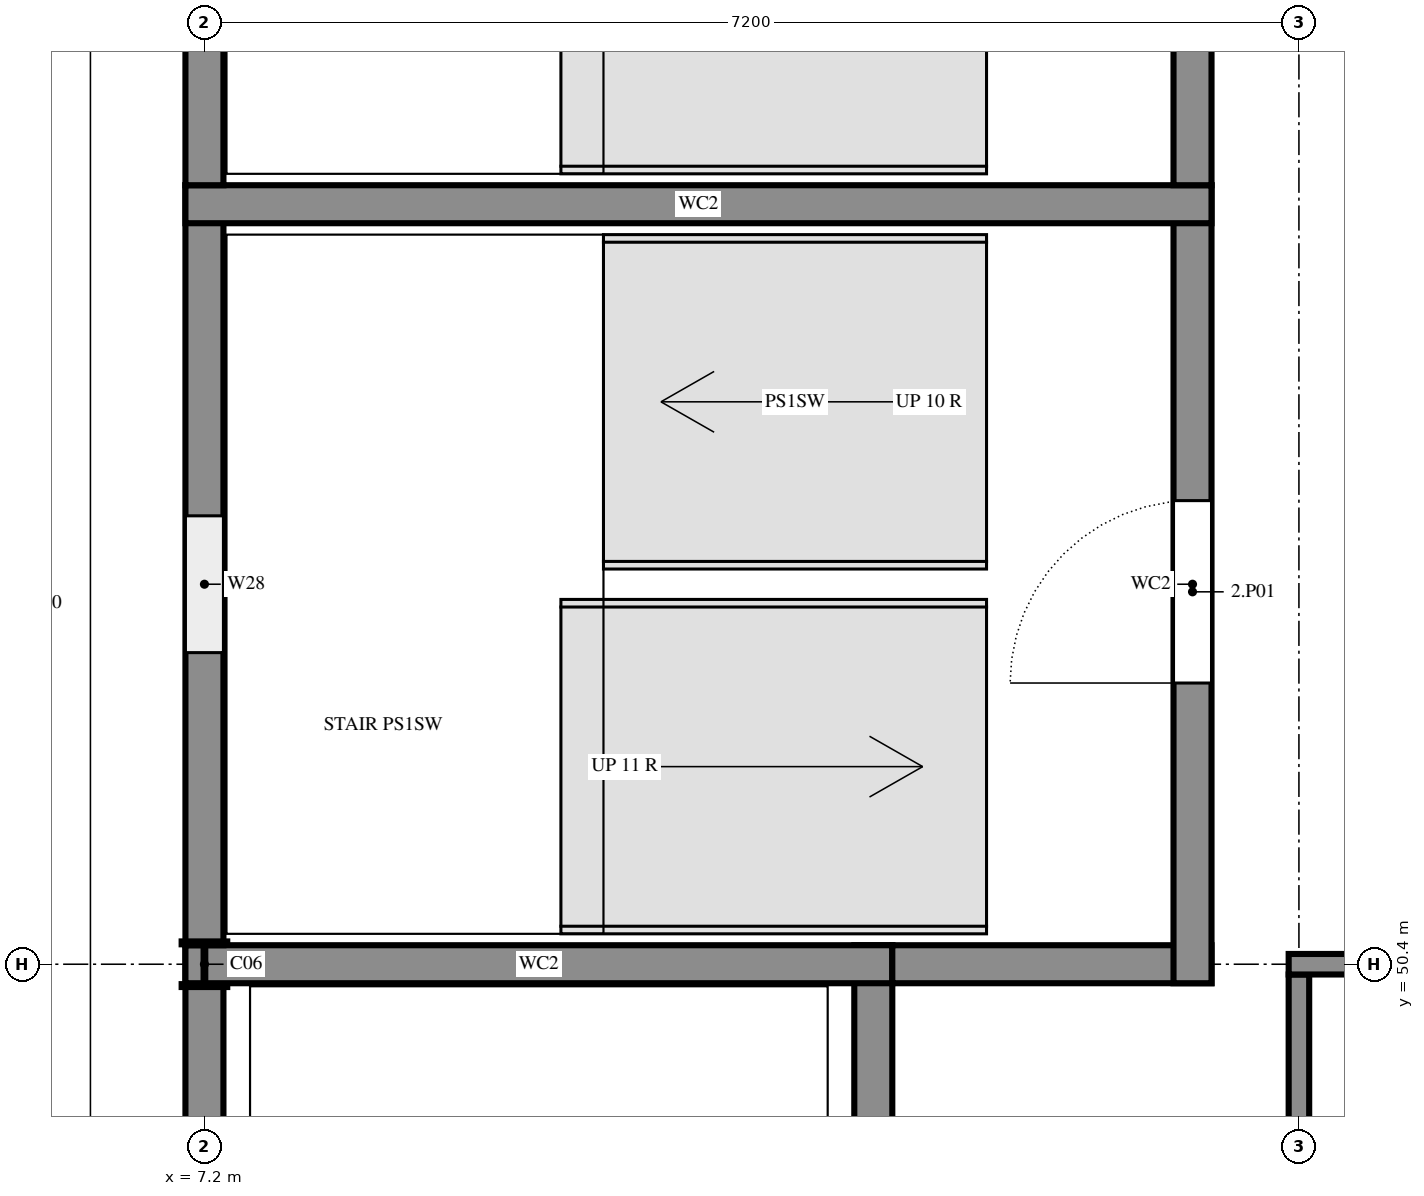
"""IFC4 building model, lengths in metres.
Left out: names, types, materials, properties, quantities, classifications, styles, units other than length and angle.
Written with IfcOpenShell. Run it as: python <this file> out.ifc"""

import sys

from ifc_helpers import new_model, si_unit, direction, frame, frame_2d, origin, origin_2d, place, context, subcontext, project, spatial, rectangle, i_section, extrude, element, fill, save


model = new_model("IFC4")
c1 = context("Model", 3, precision=1e-05, world=origin(), true_north=direction((0.0, 1.0)))
c2 = subcontext(c1, "Body", "Model", "MODEL_VIEW")
j1 = project(units=[si_unit("LENGTHUNIT", "METRE"), si_unit("PLANEANGLEUNIT", "RADIAN")], contexts=[c1])
p1 = place(None, origin())
s1 = spatial("IfcSite", under=j1, at=p1, CompositionType="ELEMENT")
p2 = place(p1, origin())
s2 = spatial("IfcBuilding", under=s1, at=p2, CompositionType="ELEMENT")
p3 = place(p2, frame((0.0, 0.0, 7.2)))
s3 = spatial("IfcBuildingStorey", under=s2, at=p3, CompositionType="ELEMENT", Elevation=7.2)
p4 = place(p3, frame((7.2, 50.4, 0.0), z_axis=(0.0, 0.0, 1.0), x_axis=(1.0, 0.0, 0.0)))
e1 = element("IfcColumn", 1, at=p4, inside=s3, PredefinedType="COLUMN", context=c2, shape_type="SweptSolid", body=[
    extrude(i_section(OverallWidth=0.3, OverallDepth=0.3, WebThickness=0.011, FlangeThickness=0.019, FilletRadius=0.027, at=origin_2d()), origin(), (0.0, 0.0, 1.0), 3.6),
])
p5 = place(p3, frame((11.6, 44.275, 0.0), z_axis=(0.0, 0.0, 1.0), x_axis=(0.0, 1.0, 0.0)))
e2 = element("IfcWall", 2, at=p5, inside=s3, PredefinedType="SHEAR", context=c2, shape_type="SweptSolid", body=[
    extrude(rectangle(XDim=6.25, YDim=0.25, at=frame_2d((3.125, 0.0))), origin(), (0.0, 0.0, 1.0), 3.6),
])
p6 = place(p5, frame((0.375, 0.0, 0.0)))
e3 = element("IfcOpeningElement", 3, at=p6, cuts=e2, PredefinedType="OPENING", context=c2, shape_type="SweptSolid", body=[
    extrude(rectangle(XDim=1.0, YDim=2.4, at=frame_2d((0.5, 1.2))), frame((0.0, 0.135, 0.0), z_axis=(0.0, -1.0, 0.0), x_axis=(1.0, 0.0, 0.0)), (0.0, 0.0, 1.0), 0.27),
])
p7 = place(p3, frame((7.2, 50.525, 0.0), z_axis=(0.0, 0.0, 1.0), x_axis=(0.0, -1.0, 0.0)))
e4 = element("IfcWall", 4, at=p7, inside=s3, PredefinedType="SHEAR", context=c2, shape_type="SweptSolid", body=[
    extrude(rectangle(XDim=6.25, YDim=0.25, at=frame_2d((3.125, 0.0))), origin(), (0.0, 0.0, 1.0), 3.6),
])
p8 = place(p7, frame((2.675, 0.0, 0.6)))
e5 = element("IfcOpeningElement", 5, at=p8, cuts=e4, PredefinedType="OPENING", context=c2, shape_type="SweptSolid", body=[
    extrude(rectangle(XDim=0.9, YDim=2.1, at=frame_2d((0.45, 1.05))), frame((0.0, 0.135, 0.0), z_axis=(0.0, -1.0, 0.0), x_axis=(1.0, 0.0, 0.0)), (0.0, 0.0, 1.0), 0.27),
])
p9 = place(p3, frame((11.725, 50.4, 0.0), z_axis=(0.0, 0.0, 1.0), x_axis=(-1.0, 0.0, 0.0)))
e6 = element("IfcWall", 6, at=p9, inside=s3, PredefinedType="SHEAR", context=c2, shape_type="SweptSolid", body=[
    extrude(rectangle(XDim=4.65, YDim=0.25, at=frame_2d((2.325, 0.0))), origin(), (0.0, 0.0, 1.0), 3.6),
])
p10 = place(p3, frame((11.725, 50.4, 0.0), z_axis=(0.0, 0.0, 1.0), x_axis=(1.0, 0.0, 0.0)))
e7 = element("IfcWall", 7, at=p10, inside=s3, PredefinedType="SHEAR", context=c2, shape_type="SweptSolid", body=[
    extrude(rectangle(XDim=2.1, YDim=0.25, at=frame_2d((1.05, 0.0))), origin(), (0.0, 0.0, 1.0), 3.6),
])
p11 = place(p3, frame((13.7, 50.275, 0.0), z_axis=(0.0, 0.0, 1.0), x_axis=(0.0, 1.0, 0.0)))
e8 = element("IfcWall", 8, at=p11, inside=s3, PredefinedType="SHEAR", context=c2, shape_type="SweptSolid", body=[
    extrude(rectangle(XDim=5.25, YDim=0.25, at=frame_2d((2.625, 0.0))), origin(), (0.0, 0.0, 1.0), 3.6),
])
p12 = place(p11, frame((1.975, 0.0, 0.0)))
e9 = element("IfcOpeningElement", 9, at=p12, cuts=e8, PredefinedType="OPENING", context=c2, shape_type="SweptSolid", body=[
    extrude(rectangle(XDim=1.2, YDim=2.4, at=frame_2d((0.6, 1.2))), frame((0.0, 0.135, 0.0), z_axis=(0.0, -1.0, 0.0), x_axis=(1.0, 0.0, 0.0)), (0.0, 0.0, 1.0), 0.27),
])
p13 = place(p3, frame((7.2, 55.525, 0.0), z_axis=(0.0, 0.0, 1.0), x_axis=(0.0, -1.0, 0.0)))
e10 = element("IfcWall", 10, at=p13, inside=s3, PredefinedType="SHEAR", context=c2, shape_type="SweptSolid", body=[
    extrude(rectangle(XDim=5.0, YDim=0.25, at=frame_2d((2.5, 0.0))), origin(), (0.0, 0.0, 1.0), 3.6),
])
p14 = place(p13, frame((2.175, 0.0, 0.6)))
e11 = element("IfcOpeningElement", 11, at=p14, cuts=e10, PredefinedType="OPENING", context=c2, shape_type="SweptSolid", body=[
    extrude(rectangle(XDim=0.9, YDim=2.1, at=frame_2d((0.45, 1.05))), frame((0.0, 0.135, 0.0), z_axis=(0.0, -1.0, 0.0), x_axis=(1.0, 0.0, 0.0)), (0.0, 0.0, 1.0), 0.27),
])
p15 = place(p3, frame((13.825, 55.4, 0.0), z_axis=(0.0, 0.0, 1.0), x_axis=(-1.0, 0.0, 0.0)))
e12 = element("IfcWall", 12, at=p15, inside=s3, PredefinedType="SHEAR", context=c2, shape_type="SweptSolid", body=[
    extrude(rectangle(XDim=6.75, YDim=0.25, at=frame_2d((3.375, 0.0))), origin(), (0.0, 0.0, 1.0), 3.6),
])
p16 = place(p3, frame((13.7, 55.525, 0.0), z_axis=(0.0, 0.0, 1.0), x_axis=(0.0, 1.0, 0.0)))
e13 = element("IfcWall", 13, at=p16, inside=s3, PredefinedType="SHEAR", context=c2, shape_type="SweptSolid", body=[
    extrude(rectangle(XDim=5.0, YDim=0.25, at=frame_2d((2.5, 0.0))), origin(), (0.0, 0.0, 1.0), 3.6),
])
p17 = place(p3, frame((7.2, 60.525, 0.0), z_axis=(0.0, 0.0, 1.0), x_axis=(0.0, -1.0, 0.0)))
e14 = element("IfcWall", 14, at=p17, inside=s3, PredefinedType="SHEAR", context=c2, shape_type="SweptSolid", body=[
    extrude(rectangle(XDim=5.0, YDim=0.25, at=frame_2d((2.5, 0.0))), origin(), (0.0, 0.0, 1.0), 3.6),
])
p18 = place(p17, frame((2.175, 0.0, 0.6)))
e15 = element("IfcOpeningElement", 15, at=p18, cuts=e14, PredefinedType="OPENING", context=c2, shape_type="SweptSolid", body=[
    extrude(rectangle(XDim=0.9, YDim=2.1, at=frame_2d((0.45, 1.05))), frame((0.0, 0.135, 0.0), z_axis=(0.0, -1.0, 0.0), x_axis=(1.0, 0.0, 0.0)), (0.0, 0.0, 1.0), 0.27),
])
p19 = place(p3, frame((14.4, 50.333, 0.0), z_axis=(0.0, 0.0, 1.0), x_axis=(0.0, -1.0, 0.0)))
e16 = element("IfcWall", 16, at=p19, inside=s3, PredefinedType="PARTITIONING", context=c2, shape_type="SweptSolid", body=[
    extrude(rectangle(XDim=7.065, YDim=0.135, at=frame_2d((3.532, 0.0))), origin(), (0.0, 0.0, 1.0), 3.12),
])
p20 = place(p3, frame((18.0, 50.4, 0.0), z_axis=(0.0, 0.0, 1.0), x_axis=(-1.0, 0.0, 0.0)))
e17 = element("IfcWall", 17, at=p20, inside=s3, PredefinedType="PARTITIONING", context=c2, shape_type="SweptSolid", body=[
    extrude(rectangle(XDim=3.667, YDim=0.135, at=frame_2d((1.834, 0.0))), origin(), (0.0, 0.0, 1.0), 3.09),
])
p21 = place(p14, origin())
e18 = element("IfcWindow", 18, at=p21, inside=s3, PartitioningType="SINGLE_PANEL", PredefinedType="WINDOW", context=c2, shape_type="SweptSolid", body=[
    extrude(rectangle(XDim=0.9, YDim=2.1, at=frame_2d((0.45, 1.05))), frame((0.0, 0.03, 0.0), z_axis=(0.0, -1.0, 0.0), x_axis=(1.0, 0.0, 0.0)), (0.0, 0.0, 1.0), 0.06),
])
fill(e11, e18)
p22 = place(p12, origin())
e19 = element("IfcDoor", 19, at=p22, inside=s3, OperationType="SINGLE_SWING_RIGHT", PredefinedType="DOOR", context=c2, shape_type="SweptSolid", body=[
    extrude(rectangle(XDim=1.2, YDim=2.4, at=frame_2d((0.6, 1.2))), frame((0.0, 0.025, 0.0), z_axis=(0.0, -1.0, 0.0), x_axis=(1.0, 0.0, 0.0)), (0.0, 0.0, 1.0), 0.05),
])
fill(e9, e19)
save(model, sys.argv[1])
